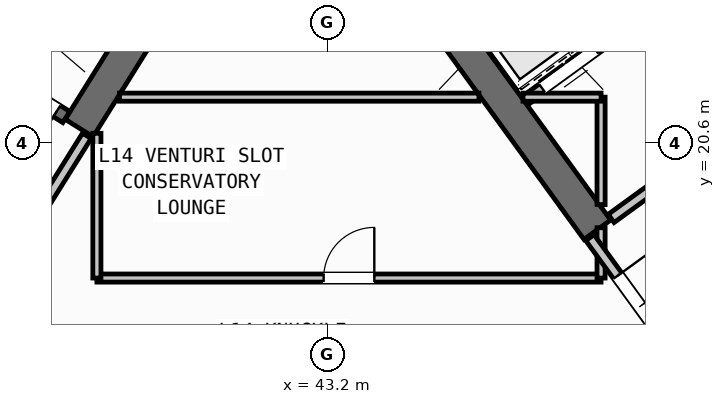
"""IFC4 building model, lengths in metres.
Left out: names, types, materials, properties, quantities, classifications, styles, units other than length and angle.
Written with IfcOpenShell. Run it as: python <this file> out.ifc"""

import sys

from ifc_helpers import new_model, si_unit, direction, frame, frame_2d, origin, place, context, subcontext, project, spatial, rectangle, extrude, source, transform, mapped, element, fill, save


model = new_model("IFC4")
c1 = context("Model", 3, precision=1e-05, world=origin(), true_north=direction((0.0, 1.0)))
c2 = subcontext(c1, "Body", "Model", "MODEL_VIEW")
j1 = project(units=[si_unit("LENGTHUNIT", "METRE"), si_unit("PLANEANGLEUNIT", "RADIAN")], contexts=[c1])
p1 = place(None, origin())
s1 = spatial("IfcSite", under=j1, at=p1, CompositionType="ELEMENT")
p2 = place(p1, origin())
s2 = spatial("IfcBuilding", under=s1, at=p2, CompositionType="ELEMENT")
p3 = place(p2, frame((0.0, 0.0, 56.4)))
s3 = spatial("IfcBuildingStorey", under=s2, at=p3, CompositionType="ELEMENT", Elevation=56.4)
p4 = place(p3, frame((40.168, 23.88, 0.0), z_axis=(0.0, 0.0, 1.0), x_axis=(-0.529893103397, -0.8480644427, 0.0)))
e1 = element("IfcWall", 1, at=p4, inside=s3, PredefinedType="SHEAR", context=c2, shape_type="SweptSolid", body=[
    extrude(rectangle(XDim=3.525, YDim=0.65, at=frame_2d((1.763, 0.0))), origin(), (0.0, 0.0, 1.0), 3.35),
])
p5 = place(p3, frame((48.526, 18.884, 0.0), z_axis=(0.0, 0.0, 1.0), x_axis=(-0.58777996584, 0.809020835181, 0.0)))
e2 = element("IfcWall", 2, at=p5, inside=s3, PredefinedType="SHEAR", context=c2, shape_type="SweptSolid", body=[
    extrude(rectangle(XDim=6.375, YDim=0.65, at=frame_2d((3.188, 0.0))), origin(), (0.0, 0.0, 1.0), 3.35),
])
p6 = place(p3, frame((38.046, 21.108, 0.0), z_axis=(0.0, 0.0, 1.0), x_axis=(-0.848054434086, 0.529909121291, 0.0)))
e3 = element("IfcWall", 3, at=p6, inside=s3, PredefinedType="SHEAR", context=c2, shape_type="SweptSolid", body=[
    extrude(rectangle(XDim=7.33, YDim=0.26, at=frame_2d((3.665, 0.0))), origin(), (0.0, 0.0, 1.0), 3.35),
])
p7 = place(p6, frame((0.22, 0.0, 0.0)))
e4 = element("IfcOpeningElement", 4, at=p7, cuts=e3, PredefinedType="OPENING", context=c2, shape_type="SweptSolid", body=[
    extrude(rectangle(XDim=1.1, YDim=2.1, at=frame_2d((0.55, 1.05))), frame((0.0, 0.14, 0.0), z_axis=(0.0, -1.0, 0.0), x_axis=(1.0, 0.0, 0.0)), (0.0, 0.0, 1.0), 0.28),
])
p8 = place(p3, frame((47.106, 21.437, 0.0), z_axis=(0.0, 0.0, 1.0), x_axis=(0.809012514015, 0.58779141893, 0.0)))
e5 = element("IfcWall", 5, at=p8, inside=s3, PredefinedType="STANDARD", context=c2, shape_type="SweptSolid", body=[
    extrude(rectangle(XDim=3.398, YDim=0.2, at=frame_2d((1.699, 0.0))), origin(), (0.0, 0.0, 1.0), 3.34),
])
p9 = place(p8, frame((0.408, 0.0, 0.0)))
e6 = element("IfcOpeningElement", 6, at=p9, cuts=e5, PredefinedType="OPENING", context=c2, shape_type="SweptSolid", body=[
    extrude(rectangle(XDim=1.3, YDim=2.2, at=frame_2d((0.65, 1.1))), frame((0.0, 0.11, 0.0), z_axis=(0.0, -1.0, 0.0), x_axis=(1.0, 0.0, 0.0)), (0.0, 0.0, 1.0), 0.22),
])
p10 = place(p3, frame((48.799, 19.107, 0.0), z_axis=(0.0, 0.0, 1.0), x_axis=(0.809012959416, 0.587790805897, 0.0)))
e7 = element("IfcWall", 7, at=p10, inside=s3, PredefinedType="STANDARD", context=c2, shape_type="SweptSolid", body=[
    extrude(rectangle(XDim=5.718, YDim=0.2, at=frame_2d((2.859, 0.0))), origin(), (0.0, 0.0, 1.0), 3.34),
])
p11 = place(p10, frame((2.498, 0.0, 0.0)))
e8 = element("IfcOpeningElement", 8, at=p11, cuts=e7, PredefinedType="OPENING", context=c2, shape_type="SweptSolid", body=[
    extrude(rectangle(XDim=1.15, YDim=2.1, at=frame_2d((0.575, 1.05))), frame((0.0, 0.11, 0.0), z_axis=(0.0, -1.0, 0.0), x_axis=(1.0, 0.0, 0.0)), (0.0, 0.0, 1.0), 0.22),
])
p12 = place(p3, frame((38.451, 20.737, 0.0), z_axis=(0.0, 0.0, 1.0), x_axis=(-0.529924799939, -0.848044637038, 0.0)))
e9 = element("IfcWall", 9, at=p12, inside=s3, PredefinedType="STANDARD", context=c2, shape_type="SweptSolid", body=[
    extrude(rectangle(XDim=2.96, YDim=0.2, at=frame_2d((1.48, 0.0))), origin(), (0.0, 0.0, 1.0), 3.34),
])
p13 = place(p12, frame((1.46, 0.0, 0.0)))
e10 = element("IfcOpeningElement", 10, at=p13, cuts=e9, PredefinedType="OPENING", context=c2, shape_type="SweptSolid", body=[
    extrude(rectangle(XDim=0.86, YDim=2.05, at=frame_2d((0.43, 1.025))), frame((0.0, 0.11, 0.0), z_axis=(0.0, -1.0, 0.0), x_axis=(1.0, 0.0, 0.0)), (0.0, 0.0, 1.0), 0.22),
])
p14 = place(p3, frame((38.65, 17.93, 0.0), z_axis=(0.0, 0.0, 1.0), x_axis=(1.0, 0.0, 0.0)))
e11 = element("IfcWall", 11, at=p14, inside=s3, PredefinedType="PARTITIONING", context=c2, shape_type="SweptSolid", body=[
    extrude(rectangle(XDim=9.95, YDim=0.16, at=frame_2d((4.975, 0.0))), origin(), (0.0, 0.0, 1.0), 3.34),
])
p15 = place(p14, frame((4.475, 0.0, 0.0)))
e12 = element("IfcOpeningElement", 12, at=p15, cuts=e11, PredefinedType="OPENING", context=c2, shape_type="SweptSolid", body=[
    extrude(rectangle(XDim=1.0, YDim=2.1, at=frame_2d((0.5, 1.05))), frame((0.0, 0.09, 0.0), z_axis=(0.0, -1.0, 0.0), x_axis=(1.0, 0.0, 0.0)), (0.0, 0.0, 1.0), 0.18),
])
p16 = place(p3, frame((38.65, 17.93, 0.0), z_axis=(0.0, 0.0, 1.0), x_axis=(0.0, 1.0, 0.0)))
e13 = element("IfcWall", 13, at=p16, inside=s3, PredefinedType="PARTITIONING", context=c2, shape_type="SweptSolid", body=[
    extrude(rectangle(XDim=2.857, YDim=0.16, at=frame_2d((1.428, 0.0))), origin(), (0.0, 0.0, 1.0), 3.34),
])
p17 = place(p3, frame((48.6, 17.93, 0.0), z_axis=(0.0, 0.0, 1.0), x_axis=(0.0, 1.0, 0.0)))
e14 = element("IfcWall", 14, at=p17, inside=s3, PredefinedType="PARTITIONING", context=c2, shape_type="SweptSolid", body=[
    extrude(rectangle(XDim=0.993, YDim=0.16, at=frame_2d((0.496, 0.0))), origin(), (0.0, 0.0, 1.0), 3.34),
])
p18 = place(p3, frame((48.6, 19.38, 0.0), z_axis=(0.0, 0.0, 1.0), x_axis=(0.0, 1.0, 0.0)))
e15 = element("IfcWall", 15, at=p18, inside=s3, PredefinedType="PARTITIONING", context=c2, shape_type="SweptSolid", body=[
    extrude(rectangle(XDim=2.12, YDim=0.16, at=frame_2d((1.06, 0.0))), origin(), (0.0, 0.0, 1.0), 3.34),
])
p19 = place(p3, frame((39.095, 21.5, 0.0), z_axis=(0.0, 0.0, 1.0), x_axis=(1.0, 0.0, 0.0)))
e16 = element("IfcWall", 16, at=p19, inside=s3, PredefinedType="PARTITIONING", context=c2, shape_type="SweptSolid", body=[
    extrude(rectangle(XDim=7.094, YDim=0.16, at=frame_2d((3.547, 0.0))), origin(), (0.0, 0.0, 1.0), 3.34),
])
p20 = place(p3, frame((47.06, 21.5, 0.0), z_axis=(0.0, 0.0, 1.0), x_axis=(1.0, 0.0, 0.0)))
e17 = element("IfcWall", 17, at=p20, inside=s3, PredefinedType="PARTITIONING", context=c2, shape_type="SweptSolid", body=[
    extrude(rectangle(XDim=1.54, YDim=0.16, at=frame_2d((0.77, 0.0))), origin(), (0.0, 0.0, 1.0), 3.34),
])
p21 = place(p3, frame((50.119, 16.333, 0.0), z_axis=(0.0, 0.0, 1.0), x_axis=(-0.587749856981, 0.809042709391, 0.0)))
e18 = element("IfcWall", 18, at=p21, inside=s3, PredefinedType="STANDARD", context=c2, shape_type="SweptSolid", body=[
    extrude(rectangle(XDim=2.96, YDim=0.2, at=frame_2d((1.48, 0.0))), origin(), (0.0, 0.0, 1.0), 3.34),
])
p22 = place(p21, frame((0.53, 0.0, 0.0)))
e19 = element("IfcOpeningElement", 19, at=p22, cuts=e18, PredefinedType="OPENING", context=c2, shape_type="SweptSolid", body=[
    extrude(rectangle(XDim=1.5, YDim=2.15, at=frame_2d((0.75, 1.075))), frame((0.0, 0.11, 0.0), z_axis=(0.0, -1.0, 0.0), x_axis=(1.0, 0.0, 0.0)), (0.0, 0.0, 1.0), 0.22),
])
m1 = source(origin(), c2, "Body", "SweptSolid", [
    extrude(rectangle(XDim=1.1, YDim=2.1, at=frame_2d((0.55, 1.05))), frame((0.0, 0.025, 0.0), z_axis=(0.0, -1.0, 0.0), x_axis=(1.0, 0.0, 0.0)), (0.0, 0.0, 1.0), 0.05),
])
p23 = place(p7, origin())
e20 = element("IfcDoor", 20, at=p23, inside=s3, OperationType="SINGLE_SWING_LEFT", PredefinedType="DOOR", context=c2, shape_type="MappedRepresentation", body=[
    mapped(m1, transform((0.0, 0.0, 0.0), scale=1.0)),
])
fill(e4, e20)
m2 = source(origin(), c2, "Body", "SweptSolid", [
    extrude(rectangle(XDim=1.3, YDim=2.2, at=frame_2d((0.65, 1.1))), frame((0.0, 0.025, 0.0), z_axis=(0.0, -1.0, 0.0), x_axis=(1.0, 0.0, 0.0)), (0.0, 0.0, 1.0), 0.05),
])
p24 = place(p9, origin())
e21 = element("IfcDoor", 21, at=p24, inside=s3, OperationType="DOUBLE_DOOR_SLIDING", PredefinedType="DOOR", context=c2, shape_type="MappedRepresentation", body=[
    mapped(m2, transform((0.0, 0.0, 0.0), scale=1.0)),
])
fill(e6, e21)
m3 = source(origin(), c2, "Body", "SweptSolid", [
    extrude(rectangle(XDim=1.0, YDim=2.1, at=frame_2d((0.5, 1.05))), frame((0.0, 0.025, 0.0), z_axis=(0.0, -1.0, 0.0), x_axis=(1.0, 0.0, 0.0)), (0.0, 0.0, 1.0), 0.05),
])
p25 = place(p15, origin())
e22 = element("IfcDoor", 22, at=p25, inside=s3, OperationType="SINGLE_SWING_RIGHT", PredefinedType="DOOR", context=c2, shape_type="MappedRepresentation", body=[
    mapped(m3, transform((0.0, 0.0, 0.0), scale=1.0)),
])
fill(e12, e22)
m4 = source(origin(), c2, "Body", "SweptSolid", [
    extrude(rectangle(XDim=1.5, YDim=2.15, at=frame_2d((0.75, 1.075))), frame((0.0, 0.025, 0.0), z_axis=(0.0, -1.0, 0.0), x_axis=(1.0, 0.0, 0.0)), (0.0, 0.0, 1.0), 0.05),
])
p26 = place(p22, frame((1.5, 0.0, 0.0), z_axis=(0.0, 0.0, 1.0), x_axis=(-1.0, 0.0, 0.0)))
e23 = element("IfcDoor", 23, at=p26, inside=s3, OperationType="DOUBLE_DOOR_SINGLE_SWING", PredefinedType="DOOR", context=c2, shape_type="MappedRepresentation", body=[
    mapped(m4, transform((0.0, 0.0, 0.0), scale=1.0)),
])
fill(e19, e23)
save(model, sys.argv[1])
